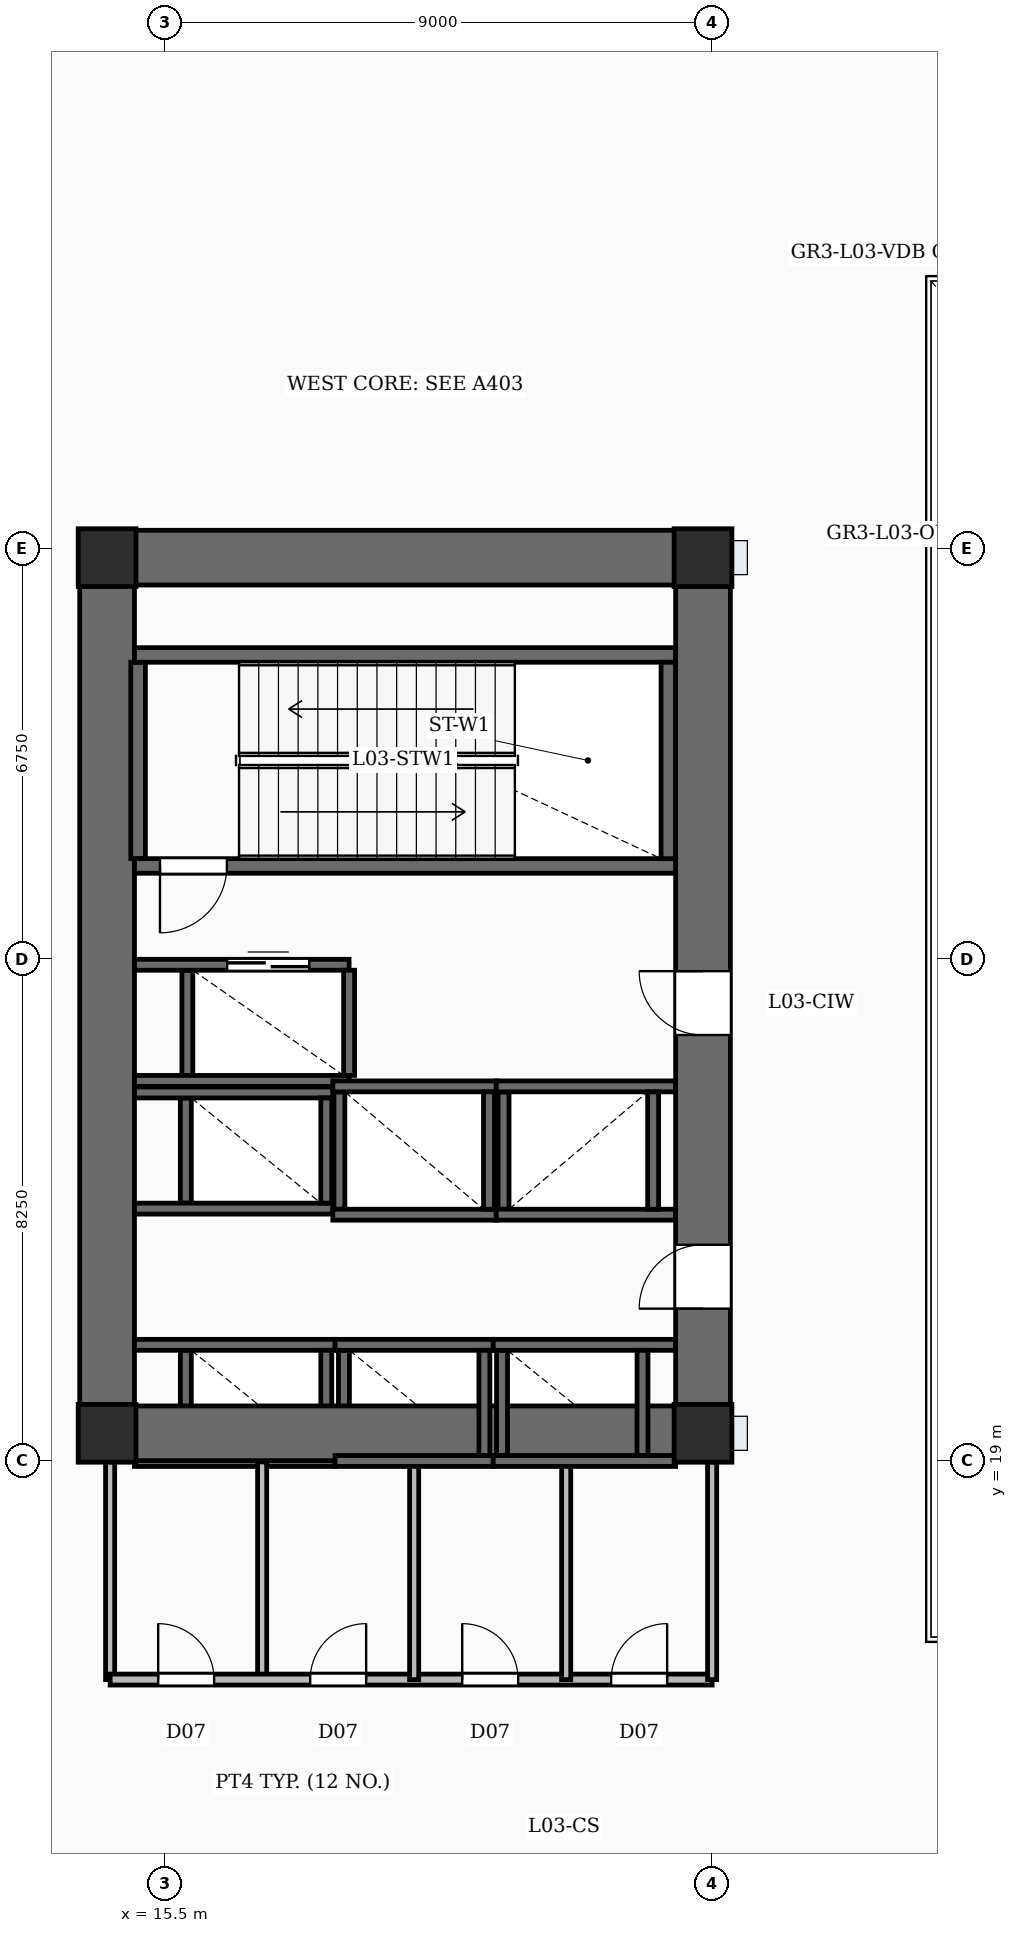
"""IFC4 building model, lengths in metres.
Left out: names, types, materials, properties, quantities, classifications, styles, units other than length and angle.
Written with IfcOpenShell. Run it as: python <this file> out.ifc"""

import sys

from ifc_helpers import new_model, si_unit, direction, frame, frame_2d, origin, origin_2d, place, context, subcontext, project, spatial, rectangle, extrude, element, fill, save


model = new_model("IFC4")
c1 = context("Model", 3, precision=1e-05, world=origin(), true_north=direction((0.0, 1.0)))
c2 = subcontext(c1, "Body", "Model", "MODEL_VIEW")
j1 = project(units=[si_unit("LENGTHUNIT", "METRE"), si_unit("PLANEANGLEUNIT", "RADIAN")], contexts=[c1])
p1 = place(None, origin())
s1 = spatial("IfcSite", under=j1, at=p1, CompositionType="ELEMENT")
p2 = place(p1, origin())
s2 = spatial("IfcBuilding", under=s1, at=p2, CompositionType="ELEMENT")
p3 = place(p2, frame((0.0, 0.0, 18.0)))
s3 = spatial("IfcBuildingStorey", under=s2, at=p3, CompositionType="ELEMENT", Elevation=18.0)
p4 = place(p3, frame((14.55, 19.0, -0.35), z_axis=(0.0, 0.0, 1.0), x_axis=(0.0, 1.0, 0.0)))
e1 = element("IfcWall", 1, at=p4, inside=s3, PredefinedType="SHEAR", context=c2, shape_type="SweptSolid", body=[
    extrude(rectangle(XDim=15.3, YDim=0.9, at=frame_2d((7.65, 0.0))), origin(), (0.0, 0.0, 1.0), 5.0),
])
p5 = place(p3, frame((24.35, 19.0, -0.35), z_axis=(0.0, 0.0, 1.0), x_axis=(0.0, 1.0, 0.0)))
e2 = element("IfcWall", 2, at=p5, inside=s3, PredefinedType="SHEAR", context=c2, shape_type="SweptSolid", body=[
    extrude(rectangle(XDim=15.3, YDim=0.9, at=frame_2d((7.65, 0.0))), origin(), (0.0, 0.0, 1.0), 5.0),
])
p6 = place(p5, frame((2.5, 0.0, 0.35)))
e3 = element("IfcOpeningElement", 3, at=p6, cuts=e2, PredefinedType="OPENING", context=c2, shape_type="SweptSolid", body=[
    extrude(rectangle(XDim=1.05, YDim=2.15, at=frame_2d((0.525, 1.075))), frame((0.0, 0.46, 0.0), z_axis=(0.0, -1.0, 0.0), x_axis=(1.0, 0.0, 0.0)), (0.0, 0.0, 1.0), 0.92),
])
p7 = place(p5, frame((7.0, 0.0, 0.35)))
e4 = element("IfcOpeningElement", 4, at=p7, cuts=e2, PredefinedType="OPENING", context=c2, shape_type="SweptSolid", body=[
    extrude(rectangle(XDim=1.05, YDim=2.15, at=frame_2d((0.525, 1.075))), frame((0.0, 0.46, 0.0), z_axis=(0.0, -1.0, 0.0), x_axis=(1.0, 0.0, 0.0)), (0.0, 0.0, 1.0), 0.92),
])
for number, where, z_axis, x_axis in (
    (5, (15.0, 19.45, -0.35), (0.0, 0.0, 1.0), (1.0, 0.0, 0.0)),
    (6, (15.0, 33.85, -0.35), (0.0, 0.0, 1.0), (1.0, 0.0, 0.0)),
):
    element("IfcWall", number, at=place(p3, frame(where, z_axis=z_axis, x_axis=x_axis)), inside=s3, PredefinedType="SHEAR", context=c2, shape_type="SweptSolid", body=[
        extrude(rectangle(XDim=8.9, YDim=0.9, at=frame_2d((4.45, 0.0))), origin(), (0.0, 0.0, 1.0), 5.0),
    ])
for number, where, z_axis, x_axis in (
    (7, (14.55, 19.45, -0.35), (0.0, 0.0, 1.0), (1.0, 0.0, 0.0)),
    (8, (24.35, 19.45, -0.35), (0.0, 0.0, 1.0), (1.0, 0.0, 0.0)),
    (9, (14.55, 33.85, -0.35), (0.0, 0.0, 1.0), (1.0, 0.0, 0.0)),
    (10, (24.35, 33.85, -0.35), (0.0, 0.0, 1.0), (1.0, 0.0, 0.0)),
):
    element("IfcColumn", number, at=place(p3, frame(where, z_axis=z_axis, x_axis=x_axis)), inside=s3, PredefinedType="COLUMN", context=c2, shape_type="SweptSolid", body=[
        extrude(rectangle(XDim=0.95, YDim=0.95, at=origin_2d()), origin(), (0.0, 0.0, 1.0), 5.0),
    ])
p8 = place(p3, frame((23.9, 28.78, 0.0), z_axis=(0.0, 0.0, 1.0), x_axis=(-1.0, 0.0, 0.0)))
e11 = element("IfcWall", 11, at=p8, inside=s3, PredefinedType="SOLIDWALL", context=c2, shape_type="SweptSolid", body=[
    extrude(rectangle(XDim=8.9, YDim=0.24, at=frame_2d((4.45, 0.0))), origin(), (0.0, 0.0, 1.0), 4.65),
])
p9 = place(p8, frame((7.38, 0.0, 0.0)))
e12 = element("IfcOpeningElement", 12, at=p9, cuts=e11, PredefinedType="OPENING", context=c2, shape_type="SweptSolid", body=[
    extrude(rectangle(XDim=1.1, YDim=2.15, at=frame_2d((0.55, 1.075))), frame((0.0, 0.13, 0.0), z_axis=(0.0, -1.0, 0.0), x_axis=(1.0, 0.0, 0.0)), (0.0, 0.0, 1.0), 0.26),
])
p10 = place(p3, frame((15.0, 32.25, 0.0), z_axis=(0.0, 0.0, 1.0), x_axis=(1.0, 0.0, 0.0)))
e13 = element("IfcWall", 13, at=p10, inside=s3, PredefinedType="SOLIDWALL", context=c2, shape_type="SweptSolid", body=[
    extrude(rectangle(XDim=8.9, YDim=0.24, at=frame_2d((4.45, 0.0))), origin(), (0.0, 0.0, 1.0), 4.65),
])
for number, where, z_axis, x_axis in (
    (14, (15.06, 28.9, 0.0), (0.0, 0.0, 1.0), (0.0, 1.0, 0.0)),
    (15, (23.78, 28.9, 0.0), (0.0, 0.0, 1.0), (0.0, 1.0, 0.0)),
):
    element("IfcWall", number, at=place(p3, frame(where, z_axis=z_axis, x_axis=x_axis)), inside=s3, PredefinedType="SOLIDWALL", context=c2, shape_type="SweptSolid", body=[
        extrude(rectangle(XDim=3.23, YDim=0.24, at=frame_2d((1.615, 0.0))), origin(), (0.0, 0.0, 1.0), 4.65),
    ])
for number, where, z_axis, x_axis in (
    (16, (15.0, 20.905, 0.0), (0.0, 0.0, 1.0), (1.0, 0.0, 0.0)),
    (17, (15.0, 18.995, 0.0), (0.0, 0.0, 1.0), (1.0, 0.0, 0.0)),
):
    element("IfcWall", number, at=place(p3, frame(where, z_axis=z_axis, x_axis=x_axis)), inside=s3, PredefinedType="SOLIDWALL", context=c2, shape_type="SweptSolid", body=[
        extrude(rectangle(XDim=3.3, YDim=0.18, at=frame_2d((1.65, 0.0))), origin(), (0.0, 0.0, 1.0), 4.65),
    ])
for number, where, z_axis, x_axis in (
    (18, (15.845, 19.085, 0.0), (0.0, 0.0, 1.0), (0.0, 1.0, 0.0)),
    (19, (18.155, 19.085, 0.0), (0.0, 0.0, 1.0), (0.0, 1.0, 0.0)),
):
    element("IfcWall", number, at=place(p3, frame(where, z_axis=z_axis, x_axis=x_axis)), inside=s3, PredefinedType="SOLIDWALL", context=c2, shape_type="SweptSolid", body=[
        extrude(rectangle(XDim=1.73, YDim=0.18, at=frame_2d((0.865, 0.0))), origin(), (0.0, 0.0, 1.0), 4.65),
    ])
for number, where, z_axis, x_axis in (
    (20, (18.3, 20.905, 0.0), (0.0, 0.0, 1.0), (1.0, 0.0, 0.0)),
    (21, (18.3, 18.995, 0.0), (0.0, 0.0, 1.0), (1.0, 0.0, 0.0)),
):
    element("IfcWall", number, at=place(p3, frame(where, z_axis=z_axis, x_axis=x_axis)), inside=s3, PredefinedType="SOLIDWALL", context=c2, shape_type="SweptSolid", body=[
        extrude(rectangle(XDim=2.6, YDim=0.18, at=frame_2d((1.3, 0.0))), origin(), (0.0, 0.0, 1.0), 4.65),
    ])
for number, where, z_axis, x_axis in (
    (22, (18.445, 19.085, 0.0), (0.0, 0.0, 1.0), (0.0, 1.0, 0.0)),
    (23, (20.755, 19.085, 0.0), (0.0, 0.0, 1.0), (0.0, 1.0, 0.0)),
):
    element("IfcWall", number, at=place(p3, frame(where, z_axis=z_axis, x_axis=x_axis)), inside=s3, PredefinedType="SOLIDWALL", context=c2, shape_type="SweptSolid", body=[
        extrude(rectangle(XDim=1.73, YDim=0.18, at=frame_2d((0.865, 0.0))), origin(), (0.0, 0.0, 1.0), 4.65),
    ])
for number, where, z_axis, x_axis in (
    (24, (20.9, 20.905, 0.0), (0.0, 0.0, 1.0), (1.0, 0.0, 0.0)),
    (25, (20.9, 18.995, 0.0), (0.0, 0.0, 1.0), (1.0, 0.0, 0.0)),
):
    element("IfcWall", number, at=place(p3, frame(where, z_axis=z_axis, x_axis=x_axis)), inside=s3, PredefinedType="SOLIDWALL", context=c2, shape_type="SweptSolid", body=[
        extrude(rectangle(XDim=3.0, YDim=0.18, at=frame_2d((1.5, 0.0))), origin(), (0.0, 0.0, 1.0), 4.65),
    ])
for number, where, z_axis, x_axis in (
    (26, (21.045, 19.085, 0.0), (0.0, 0.0, 1.0), (0.0, 1.0, 0.0)),
    (27, (23.355, 19.085, 0.0), (0.0, 0.0, 1.0), (0.0, 1.0, 0.0)),
):
    element("IfcWall", number, at=place(p3, frame(where, z_axis=z_axis, x_axis=x_axis)), inside=s3, PredefinedType="SOLIDWALL", context=c2, shape_type="SweptSolid", body=[
        extrude(rectangle(XDim=1.73, YDim=0.18, at=frame_2d((0.865, 0.0))), origin(), (0.0, 0.0, 1.0), 4.65),
    ])
for number, where, z_axis, x_axis in (
    (28, (15.0, 25.055, 0.0), (0.0, 0.0, 1.0), (1.0, 0.0, 0.0)),
    (29, (15.0, 23.145, 0.0), (0.0, 0.0, 1.0), (1.0, 0.0, 0.0)),
):
    element("IfcWall", number, at=place(p3, frame(where, z_axis=z_axis, x_axis=x_axis)), inside=s3, PredefinedType="SOLIDWALL", context=c2, shape_type="SweptSolid", body=[
        extrude(rectangle(XDim=3.262, YDim=0.18, at=frame_2d((1.631, 0.0))), origin(), (0.0, 0.0, 1.0), 4.65),
    ])
for number, where, z_axis, x_axis in (
    (30, (15.845, 23.235, 0.0), (0.0, 0.0, 1.0), (0.0, 1.0, 0.0)),
    (31, (18.155, 23.235, 0.0), (0.0, 0.0, 1.0), (0.0, 1.0, 0.0)),
):
    element("IfcWall", number, at=place(p3, frame(where, z_axis=z_axis, x_axis=x_axis)), inside=s3, PredefinedType="SOLIDWALL", context=c2, shape_type="SweptSolid", body=[
        extrude(rectangle(XDim=1.73, YDim=0.18, at=frame_2d((0.865, 0.0))), origin(), (0.0, 0.0, 1.0), 4.65),
    ])
for number, where, z_axis, x_axis in (
    (32, (18.262, 25.155, 0.0), (0.0, 0.0, 1.0), (1.0, 0.0, 0.0)),
    (33, (18.262, 23.045, 0.0), (0.0, 0.0, 1.0), (1.0, 0.0, 0.0)),
):
    element("IfcWall", number, at=place(p3, frame(where, z_axis=z_axis, x_axis=x_axis)), inside=s3, PredefinedType="SOLIDWALL", context=c2, shape_type="SweptSolid", body=[
        extrude(rectangle(XDim=2.688, YDim=0.18, at=frame_2d((1.344, 0.0))), origin(), (0.0, 0.0, 1.0), 4.65),
    ])
for number, where, z_axis, x_axis in (
    (34, (18.37, 23.135, 0.0), (0.0, 0.0, 1.0), (0.0, 1.0, 0.0)),
    (35, (20.83, 23.135, 0.0), (0.0, 0.0, 1.0), (0.0, 1.0, 0.0)),
):
    element("IfcWall", number, at=place(p3, frame(where, z_axis=z_axis, x_axis=x_axis)), inside=s3, PredefinedType="SOLIDWALL", context=c2, shape_type="SweptSolid", body=[
        extrude(rectangle(XDim=1.93, YDim=0.18, at=frame_2d((0.965, 0.0))), origin(), (0.0, 0.0, 1.0), 4.65),
    ])
for number, where, z_axis, x_axis in (
    (36, (20.95, 25.155, 0.0), (0.0, 0.0, 1.0), (1.0, 0.0, 0.0)),
    (37, (20.95, 23.045, 0.0), (0.0, 0.0, 1.0), (1.0, 0.0, 0.0)),
):
    element("IfcWall", number, at=place(p3, frame(where, z_axis=z_axis, x_axis=x_axis)), inside=s3, PredefinedType="SOLIDWALL", context=c2, shape_type="SweptSolid", body=[
        extrude(rectangle(XDim=2.95, YDim=0.18, at=frame_2d((1.475, 0.0))), origin(), (0.0, 0.0, 1.0), 4.65),
    ])
for number, where, z_axis, x_axis in (
    (38, (21.07, 23.135, 0.0), (0.0, 0.0, 1.0), (0.0, 1.0, 0.0)),
    (39, (23.53, 23.135, 0.0), (0.0, 0.0, 1.0), (0.0, 1.0, 0.0)),
):
    element("IfcWall", number, at=place(p3, frame(where, z_axis=z_axis, x_axis=x_axis)), inside=s3, PredefinedType="SOLIDWALL", context=c2, shape_type="SweptSolid", body=[
        extrude(rectangle(XDim=1.93, YDim=0.18, at=frame_2d((0.965, 0.0))), origin(), (0.0, 0.0, 1.0), 4.65),
    ])
p11 = place(p3, frame((15.0, 27.155, 0.0), z_axis=(0.0, 0.0, 1.0), x_axis=(1.0, 0.0, 0.0)))
e40 = element("IfcWall", 40, at=p11, inside=s3, PredefinedType="SOLIDWALL", context=c2, shape_type="SweptSolid", body=[
    extrude(rectangle(XDim=3.53, YDim=0.18, at=frame_2d((1.765, 0.0))), origin(), (0.0, 0.0, 1.0), 4.65),
])
p12 = place(p11, frame((1.525, 0.0, 0.0)))
e41 = element("IfcOpeningElement", 41, at=p12, cuts=e40, PredefinedType="OPENING", context=c2, shape_type="SweptSolid", body=[
    extrude(rectangle(XDim=1.35, YDim=2.3, at=frame_2d((0.675, 1.15))), frame((0.0, 0.1, 0.0), z_axis=(0.0, -1.0, 0.0), x_axis=(1.0, 0.0, 0.0)), (0.0, 0.0, 1.0), 0.2),
])
p13 = place(p3, frame((15.0, 25.245, 0.0), z_axis=(0.0, 0.0, 1.0), x_axis=(1.0, 0.0, 0.0)))
e42 = element("IfcWall", 42, at=p13, inside=s3, PredefinedType="SOLIDWALL", context=c2, shape_type="SweptSolid", body=[
    extrude(rectangle(XDim=3.53, YDim=0.18, at=frame_2d((1.765, 0.0))), origin(), (0.0, 0.0, 1.0), 4.65),
])
for number, where, z_axis, x_axis in (
    (43, (15.87, 25.335, 0.0), (0.0, 0.0, 1.0), (0.0, 1.0, 0.0)),
    (44, (18.53, 25.335, 0.0), (0.0, 0.0, 1.0), (0.0, 1.0, 0.0)),
):
    element("IfcWall", number, at=place(p3, frame(where, z_axis=z_axis, x_axis=x_axis)), inside=s3, PredefinedType="SOLIDWALL", context=c2, shape_type="SweptSolid", body=[
        extrude(rectangle(XDim=1.73, YDim=0.18, at=frame_2d((0.865, 0.0))), origin(), (0.0, 0.0, 1.0), 4.65),
    ])
for number, where, z_axis, x_axis in (
    (45, (17.1, 15.4, 0.0), (0.0, 0.0, 1.0), (0.0, 1.0, 0.0)),
    (46, (19.6, 15.4, 0.0), (0.0, 0.0, 1.0), (0.0, 1.0, 0.0)),
    (47, (22.1, 15.4, 0.0), (0.0, 0.0, 1.0), (0.0, 1.0, 0.0)),
):
    element("IfcWall", number, at=place(p3, frame(where, z_axis=z_axis, x_axis=x_axis)), inside=s3, PredefinedType="PARTITIONING", context=c2, shape_type="SweptSolid", body=[
        extrude(rectangle(XDim=3.58, YDim=0.15, at=frame_2d((1.79, 0.0))), origin(), (0.0, 0.0, 1.0), 3.71),
    ])
p14 = place(p3, frame((14.6, 15.4, 0.0), z_axis=(0.0, 0.0, 1.0), x_axis=(1.0, 0.0, 0.0)))
e48 = element("IfcWall", 48, at=p14, inside=s3, PredefinedType="PARTITIONING", context=c2, shape_type="SweptSolid", body=[
    extrude(rectangle(XDim=9.9, YDim=0.18, at=frame_2d((4.95, 0.0))), origin(), (0.0, 0.0, 1.0), 3.71),
])
p15 = place(p14, frame((0.79, 0.0, 0.0)))
e49 = element("IfcOpeningElement", 49, at=p15, cuts=e48, PredefinedType="OPENING", context=c2, shape_type="SweptSolid", body=[
    extrude(rectangle(XDim=0.92, YDim=2.1, at=frame_2d((0.46, 1.05))), frame((0.0, 0.1, 0.0), z_axis=(0.0, -1.0, 0.0), x_axis=(1.0, 0.0, 0.0)), (0.0, 0.0, 1.0), 0.2),
])
p16 = place(p14, frame((3.29, 0.0, 0.0)))
e50 = element("IfcOpeningElement", 50, at=p16, cuts=e48, PredefinedType="OPENING", context=c2, shape_type="SweptSolid", body=[
    extrude(rectangle(XDim=0.92, YDim=2.1, at=frame_2d((0.46, 1.05))), frame((0.0, 0.1, 0.0), z_axis=(0.0, -1.0, 0.0), x_axis=(1.0, 0.0, 0.0)), (0.0, 0.0, 1.0), 0.2),
])
p17 = place(p14, frame((5.79, 0.0, 0.0)))
e51 = element("IfcOpeningElement", 51, at=p17, cuts=e48, PredefinedType="OPENING", context=c2, shape_type="SweptSolid", body=[
    extrude(rectangle(XDim=0.92, YDim=2.1, at=frame_2d((0.46, 1.05))), frame((0.0, 0.1, 0.0), z_axis=(0.0, -1.0, 0.0), x_axis=(1.0, 0.0, 0.0)), (0.0, 0.0, 1.0), 0.2),
])
p18 = place(p14, frame((8.24, 0.0, 0.0)))
e52 = element("IfcOpeningElement", 52, at=p18, cuts=e48, PredefinedType="OPENING", context=c2, shape_type="SweptSolid", body=[
    extrude(rectangle(XDim=0.92, YDim=2.1, at=frame_2d((0.46, 1.05))), frame((0.0, 0.1, 0.0), z_axis=(0.0, -1.0, 0.0), x_axis=(1.0, 0.0, 0.0)), (0.0, 0.0, 1.0), 0.2),
])
for number, where, z_axis, x_axis in (
    (53, (14.6, 15.4, 0.0), (0.0, 0.0, 1.0), (0.0, 1.0, 0.0)),
    (54, (24.5, 15.4, 0.0), (0.0, 0.0, 1.0), (0.0, 1.0, 0.0)),
):
    element("IfcWall", number, at=place(p3, frame(where, z_axis=z_axis, x_axis=x_axis)), inside=s3, PredefinedType="PARTITIONING", context=c2, shape_type="SweptSolid", body=[
        extrude(rectangle(XDim=3.58, YDim=0.15, at=frame_2d((1.79, 0.0))), origin(), (0.0, 0.0, 1.0), 3.71),
    ])
p19 = place(p6, origin())
e55 = element("IfcDoor", 55, at=p19, inside=s3, OperationType="SINGLE_SWING_LEFT", PredefinedType="DOOR", context=c2, shape_type="SweptSolid", body=[
    extrude(rectangle(XDim=1.05, YDim=2.15, at=frame_2d((0.525, 1.075))), frame((0.0, 0.025, 0.0), z_axis=(0.0, -1.0, 0.0), x_axis=(1.0, 0.0, 0.0)), (0.0, 0.0, 1.0), 0.05),
])
fill(e3, e55)
p20 = place(p7, origin())
e56 = element("IfcDoor", 56, at=p20, inside=s3, OperationType="SINGLE_SWING_RIGHT", PredefinedType="DOOR", context=c2, shape_type="SweptSolid", body=[
    extrude(rectangle(XDim=1.05, YDim=2.15, at=frame_2d((0.525, 1.075))), frame((0.0, 0.025, 0.0), z_axis=(0.0, -1.0, 0.0), x_axis=(1.0, 0.0, 0.0)), (0.0, 0.0, 1.0), 0.05),
])
fill(e4, e56)
p21 = place(p9, origin())
e57 = element("IfcDoor", 57, at=p21, inside=s3, OperationType="SINGLE_SWING_RIGHT", PredefinedType="DOOR", context=c2, shape_type="SweptSolid", body=[
    extrude(rectangle(XDim=1.1, YDim=2.15, at=frame_2d((0.55, 1.075))), frame((0.0, 0.025, 0.0), z_axis=(0.0, -1.0, 0.0), x_axis=(1.0, 0.0, 0.0)), (0.0, 0.0, 1.0), 0.05),
])
fill(e12, e57)
p22 = place(p12, origin())
e58 = element("IfcDoor", 58, at=p22, inside=s3, OperationType="DOUBLE_DOOR_SLIDING", PredefinedType="DOOR", context=c2, shape_type="SweptSolid", body=[
    extrude(rectangle(XDim=1.35, YDim=2.3, at=frame_2d((0.675, 1.15))), frame((0.0, 0.025, 0.0), z_axis=(0.0, -1.0, 0.0), x_axis=(1.0, 0.0, 0.0)), (0.0, 0.0, 1.0), 0.05),
])
fill(e41, e58)
p23 = place(p15, origin())
e59 = element("IfcDoor", 59, at=p23, inside=s3, OperationType="SINGLE_SWING_LEFT", PredefinedType="DOOR", context=c2, shape_type="SweptSolid", body=[
    extrude(rectangle(XDim=0.92, YDim=2.1, at=frame_2d((0.46, 1.05))), frame((0.0, 0.025, 0.0), z_axis=(0.0, -1.0, 0.0), x_axis=(1.0, 0.0, 0.0)), (0.0, 0.0, 1.0), 0.05),
])
fill(e49, e59)
p24 = place(p16, origin())
e60 = element("IfcDoor", 60, at=p24, inside=s3, OperationType="SINGLE_SWING_RIGHT", PredefinedType="DOOR", context=c2, shape_type="SweptSolid", body=[
    extrude(rectangle(XDim=0.92, YDim=2.1, at=frame_2d((0.46, 1.05))), frame((0.0, 0.025, 0.0), z_axis=(0.0, -1.0, 0.0), x_axis=(1.0, 0.0, 0.0)), (0.0, 0.0, 1.0), 0.05),
])
fill(e50, e60)
p25 = place(p17, origin())
e61 = element("IfcDoor", 61, at=p25, inside=s3, OperationType="SINGLE_SWING_LEFT", PredefinedType="DOOR", context=c2, shape_type="SweptSolid", body=[
    extrude(rectangle(XDim=0.92, YDim=2.1, at=frame_2d((0.46, 1.05))), frame((0.0, 0.025, 0.0), z_axis=(0.0, -1.0, 0.0), x_axis=(1.0, 0.0, 0.0)), (0.0, 0.0, 1.0), 0.05),
])
fill(e51, e61)
p26 = place(p18, origin())
e62 = element("IfcDoor", 62, at=p26, inside=s3, OperationType="SINGLE_SWING_RIGHT", PredefinedType="DOOR", context=c2, shape_type="SweptSolid", body=[
    extrude(rectangle(XDim=0.92, YDim=2.1, at=frame_2d((0.46, 1.05))), frame((0.0, 0.025, 0.0), z_axis=(0.0, -1.0, 0.0), x_axis=(1.0, 0.0, 0.0)), (0.0, 0.0, 1.0), 0.05),
])
fill(e52, e62)
save(model, sys.argv[1])
